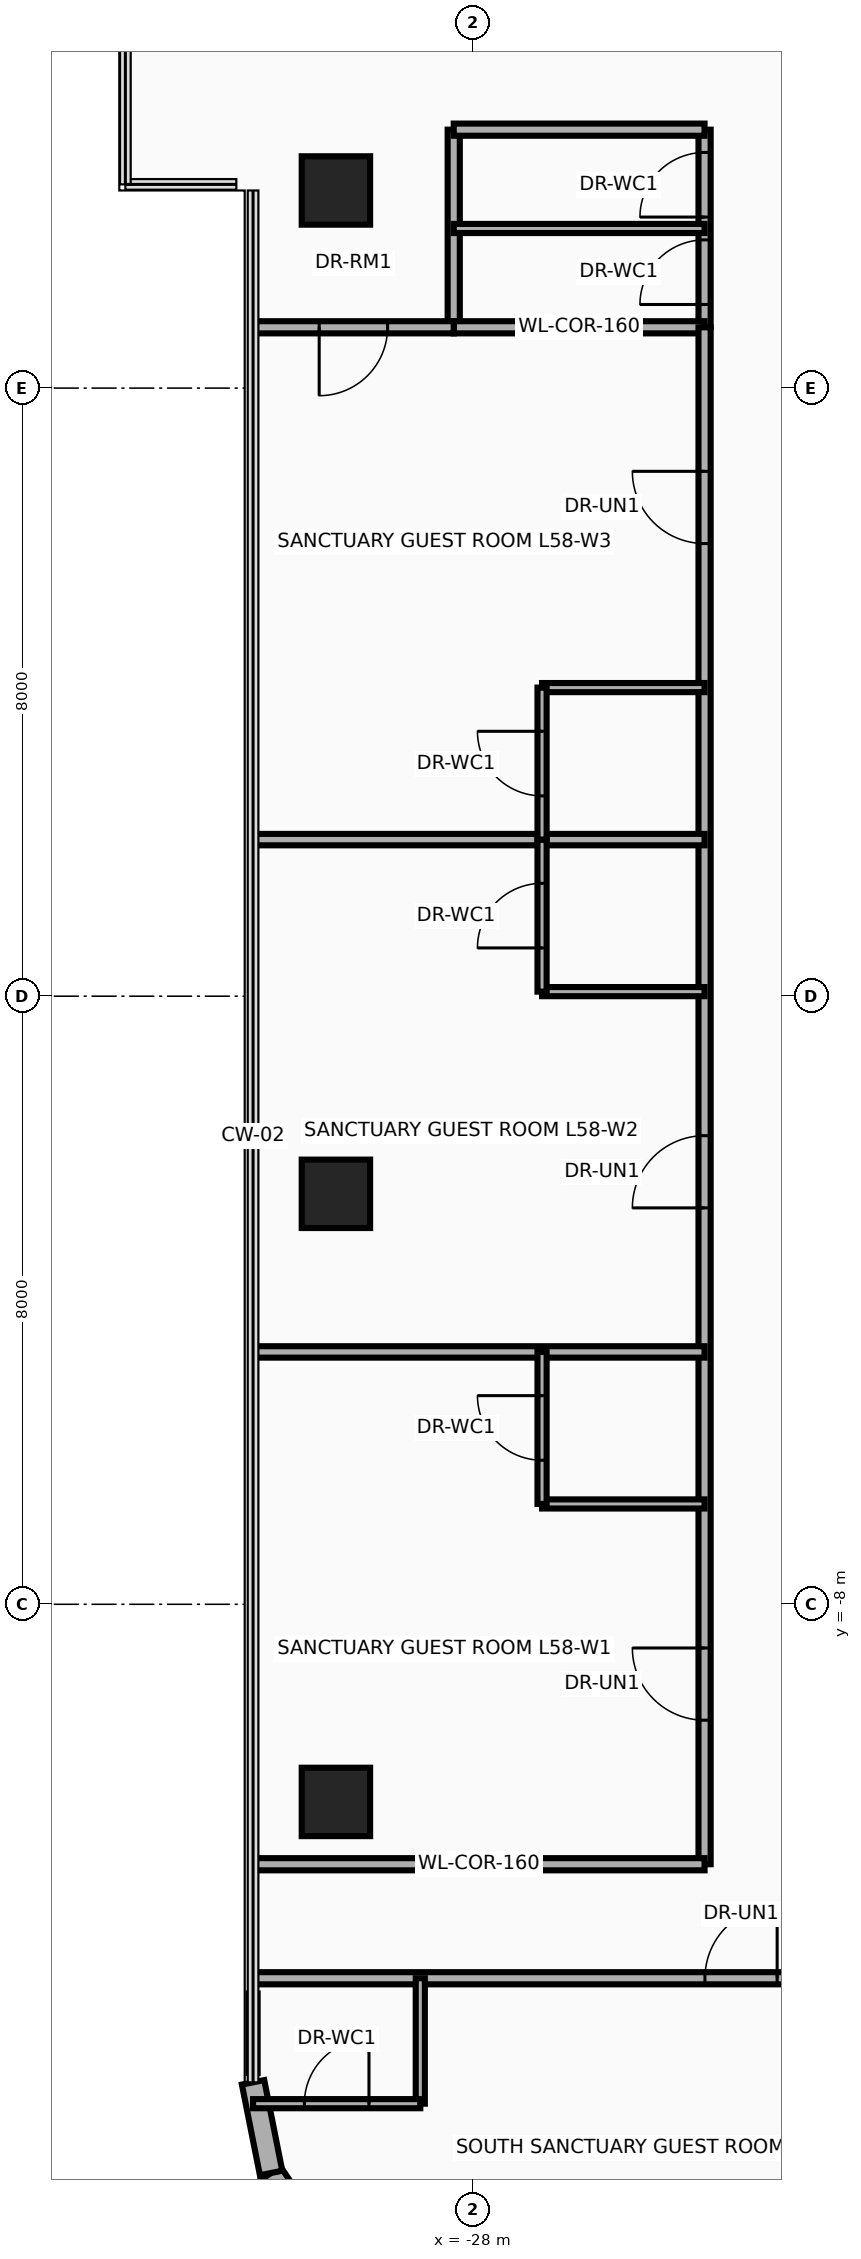
"""IFC4 building model, lengths in metres.
Left out: names, types, materials, properties, quantities, classifications, styles, units other than length and angle.
Written with IfcOpenShell. Run it as: python <this file> out.ifc"""

import sys

from ifc_helpers import new_model, si_unit, direction, frame, frame_2d, origin, origin_2d, place, context, subcontext, project, spatial, rectangle, extrude, source, transform, mapped, element, fill, save


model = new_model("IFC4")
c1 = context("Model", 3, precision=1e-05, world=origin(), true_north=direction((0.0, 1.0)))
c2 = subcontext(c1, "Body", "Model", "MODEL_VIEW")
j1 = project(units=[si_unit("LENGTHUNIT", "METRE"), si_unit("PLANEANGLEUNIT", "RADIAN")], contexts=[c1])
p1 = place(None, origin())
s1 = spatial("IfcSite", under=j1, at=p1, CompositionType="ELEMENT")
p2 = place(p1, origin())
s2 = spatial("IfcBuilding", under=s1, at=p2, CompositionType="ELEMENT")
p3 = place(p2, frame((0.0, 0.0, 226.5)))
s3 = spatial("IfcBuildingStorey", under=s2, at=p3, CompositionType="ELEMENT", Elevation=226.5)
m1 = source(origin(), c2, "Body", "SweptSolid", [
    extrude(rectangle(XDim=0.9, YDim=0.9, at=origin_2d()), origin(), (0.0, 0.0, 1.0), 3.5),
])
for number, where, z_axis, x_axis in (
    (1, (-29.8, -10.6, 0.0), (0.0, 0.0, 1.0), (1.0, 0.0, 0.0)),
    (2, (-29.8, -2.6, 0.0), (0.0, 0.0, 1.0), (1.0, 0.0, 0.0)),
    (3, (-29.8, 10.6, 0.0), (0.0, 0.0, 1.0), (1.0, 0.0, 0.0)),
):
    element("IfcColumn", number, at=place(p3, frame(where, z_axis=z_axis, x_axis=x_axis)), inside=s3, PredefinedType="COLUMN", context=c2, shape_type="MappedRepresentation", body=[
        mapped(m1, transform((0.0, 0.0, 0.0), x_axis=(1.0, 0.0, 0.0), y_axis=(0.0, 1.0, 0.0), z_axis=(0.0, 0.0, 1.0), scale=1.0)),
    ])
p4 = place(p3, frame((-29.983, -16.483, 0.0), z_axis=(0.0, 0.0, 1.0), x_axis=(-0.555635100982, 0.831426265255, 0.0)))
e4 = element("IfcWall", 4, at=p4, inside=s3, PredefinedType="SOLIDWALL", context=c2, shape_type="SweptSolid", body=[
    extrude(rectangle(XDim=1.205, YDim=0.3, at=frame_2d((0.603, 0.0))), origin(), (0.0, 0.0, 1.0), 3.26),
])
p5 = place(p3, frame((-30.653, -15.482, 0.0), z_axis=(0.0, 0.0, 1.0), x_axis=(-0.194996050505, 0.980804027463, 0.0)))
e5 = element("IfcWall", 5, at=p5, inside=s3, PredefinedType="SOLIDWALL", context=c2, shape_type="SweptSolid", body=[
    extrude(rectangle(XDim=1.216, YDim=0.3, at=frame_2d((0.608, 0.0))), origin(), (0.0, 0.0, 1.0), 3.26),
])
p6 = place(p3, frame((-28.25, 8.8, 0.0), z_axis=(0.0, 0.0, 1.0), x_axis=(0.0, 1.0, 0.0)))
e6 = element("IfcWall", 6, at=p6, inside=s3, PredefinedType="PARTITIONING", context=c2, shape_type="SweptSolid", body=[
    extrude(rectangle(XDim=2.6, YDim=0.16, at=frame_2d((1.3, 0.0))), origin(), (0.0, 0.0, 1.0), 2.544),
])
p7 = place(p3, frame((-24.95, 8.8, 0.0), z_axis=(0.0, 0.0, 1.0), x_axis=(0.0, 1.0, 0.0)))
e7 = element("IfcWall", 7, at=p7, inside=s3, PredefinedType="PARTITIONING", context=c2, shape_type="SweptSolid", body=[
    extrude(rectangle(XDim=2.6, YDim=0.16, at=frame_2d((1.3, 0.0))), origin(), (0.0, 0.0, 1.0), 2.544),
])
p8 = place(p7, frame((0.3, 0.0, 0.0)))
e8 = element("IfcOpeningElement", 8, at=p8, cuts=e7, PredefinedType="OPENING", context=c2, shape_type="SweptSolid", body=[
    extrude(rectangle(XDim=0.85, YDim=2.1, at=frame_2d((0.425, 1.05))), frame((0.0, 0.095, 0.0), z_axis=(0.0, -1.0, 0.0), x_axis=(1.0, 0.0, 0.0)), (0.0, 0.0, 1.0), 0.19),
])
p9 = place(p7, frame((1.45, 0.0, 0.0)))
e9 = element("IfcOpeningElement", 9, at=p9, cuts=e7, PredefinedType="OPENING", context=c2, shape_type="SweptSolid", body=[
    extrude(rectangle(XDim=0.85, YDim=2.1, at=frame_2d((0.425, 1.05))), frame((0.0, 0.095, 0.0), z_axis=(0.0, -1.0, 0.0), x_axis=(1.0, 0.0, 0.0)), (0.0, 0.0, 1.0), 0.19),
])
for number, where, z_axis, x_axis in (
    (10, (-28.25, 8.8, 0.0), (0.0, 0.0, 1.0), (1.0, 0.0, 0.0)),
    (11, (-28.25, 11.4, 0.0), (0.0, 0.0, 1.0), (1.0, 0.0, 0.0)),
):
    element("IfcWall", number, at=place(p3, frame(where, z_axis=z_axis, x_axis=x_axis)), inside=s3, PredefinedType="PARTITIONING", context=c2, shape_type="SweptSolid", body=[
        extrude(rectangle(XDim=3.3, YDim=0.16, at=frame_2d((1.65, 0.0))), origin(), (0.0, 0.0, 1.0), 3.26),
    ])
p10 = place(p3, frame((-28.25, 10.1, 0.0), z_axis=(0.0, 0.0, 1.0), x_axis=(1.0, 0.0, 0.0)))
e12 = element("IfcWall", 12, at=p10, inside=s3, PredefinedType="PARTITIONING", context=c2, shape_type="SweptSolid", body=[
    extrude(rectangle(XDim=3.3, YDim=0.12, at=frame_2d((1.65, 0.0))), origin(), (0.0, 0.0, 1.0), 3.26),
])
p11 = place(p3, frame((-24.95, -11.42, 0.0), z_axis=(0.0, 0.0, 1.0), x_axis=(0.0, 1.0, 0.0)))
e13 = element("IfcWall", 13, at=p11, inside=s3, PredefinedType="PARTITIONING", context=c2, shape_type="SweptSolid", body=[
    extrude(rectangle(XDim=20.22, YDim=0.16, at=frame_2d((10.11, 0.0))), origin(), (0.0, 0.0, 1.0), 2.544),
])
p12 = place(p11, frame((1.895, 0.0, 0.0)))
e14 = element("IfcOpeningElement", 14, at=p12, cuts=e13, PredefinedType="OPENING", context=c2, shape_type="SweptSolid", body=[
    extrude(rectangle(XDim=0.95, YDim=2.15, at=frame_2d((0.475, 1.075))), frame((0.0, 0.095, 0.0), z_axis=(0.0, -1.0, 0.0), x_axis=(1.0, 0.0, 0.0)), (0.0, 0.0, 1.0), 0.19),
])
p13 = place(p11, frame((8.635, 0.0, 0.0)))
e15 = element("IfcOpeningElement", 15, at=p13, cuts=e13, PredefinedType="OPENING", context=c2, shape_type="SweptSolid", body=[
    extrude(rectangle(XDim=0.95, YDim=2.15, at=frame_2d((0.475, 1.075))), frame((0.0, 0.095, 0.0), z_axis=(0.0, -1.0, 0.0), x_axis=(1.0, 0.0, 0.0)), (0.0, 0.0, 1.0), 0.19),
])
p14 = place(p11, frame((17.375, 0.0, 0.0)))
e16 = element("IfcOpeningElement", 16, at=p14, cuts=e13, PredefinedType="OPENING", context=c2, shape_type="SweptSolid", body=[
    extrude(rectangle(XDim=0.95, YDim=2.15, at=frame_2d((0.475, 1.075))), frame((0.0, 0.095, 0.0), z_axis=(0.0, -1.0, 0.0), x_axis=(1.0, 0.0, 0.0)), (0.0, 0.0, 1.0), 0.19),
])
p15 = place(p3, frame((-30.89, 8.8, 0.0), z_axis=(0.0, 0.0, 1.0), x_axis=(1.0, 0.0, 0.0)))
e17 = element("IfcWall", 17, at=p15, inside=s3, PredefinedType="PARTITIONING", context=c2, shape_type="SweptSolid", body=[
    extrude(rectangle(XDim=2.64, YDim=0.16, at=frame_2d((1.32, 0.0))), origin(), (0.0, 0.0, 1.0), 2.706),
])
p16 = place(p15, frame((0.87, 0.0, 0.0)))
e18 = element("IfcOpeningElement", 18, at=p16, cuts=e17, PredefinedType="OPENING", context=c2, shape_type="SweptSolid", body=[
    extrude(rectangle(XDim=0.9, YDim=2.1, at=frame_2d((0.45, 1.05))), frame((0.0, 0.095, 0.0), z_axis=(0.0, -1.0, 0.0), x_axis=(1.0, 0.0, 0.0)), (0.0, 0.0, 1.0), 0.19),
])
for number, where, z_axis, x_axis in (
    (19, (-30.89, -4.68, 0.0), (0.0, 0.0, 1.0), (1.0, 0.0, 0.0)),
    (20, (-30.89, 2.06, 0.0), (0.0, 0.0, 1.0), (1.0, 0.0, 0.0)),
):
    element("IfcWall", number, at=place(p3, frame(where, z_axis=z_axis, x_axis=x_axis)), inside=s3, PredefinedType="PARTITIONING", context=c2, shape_type="SweptSolid", body=[
        extrude(rectangle(XDim=5.94, YDim=0.15, at=frame_2d((2.97, 0.0))), origin(), (0.0, 0.0, 1.0), 2.706),
    ])
p17 = place(p3, frame((-27.088, -6.68, 0.0), z_axis=(0.0, 0.0, 1.0), x_axis=(1.0, 0.0, 0.0)))
e21 = element("IfcWall", 21, at=p17, inside=s3, PredefinedType="PARTITIONING", context=c2, shape_type="SweptSolid", body=[
    extrude(rectangle(XDim=2.138, YDim=0.12, at=frame_2d((1.069, 0.0))), origin(), (0.0, 0.0, 1.0), 2.839),
])
p18 = place(p3, frame((-27.088, -6.68, 0.0), z_axis=(0.0, 0.0, 1.0), x_axis=(0.0, 1.0, 0.0)))
e22 = element("IfcWall", 22, at=p18, inside=s3, PredefinedType="PARTITIONING", context=c2, shape_type="SweptSolid", body=[
    extrude(rectangle(XDim=2.0, YDim=0.12, at=frame_2d((1.0, 0.0))), origin(), (0.0, 0.0, 1.0), 2.839),
])
p19 = place(p18, frame((0.575, 0.0, 0.0)))
e23 = element("IfcOpeningElement", 23, at=p19, cuts=e22, PredefinedType="OPENING", context=c2, shape_type="SweptSolid", body=[
    extrude(rectangle(XDim=0.85, YDim=2.1, at=frame_2d((0.425, 1.05))), frame((0.0, 0.075, 0.0), z_axis=(0.0, -1.0, 0.0), x_axis=(1.0, 0.0, 0.0)), (0.0, 0.0, 1.0), 0.15),
])
p20 = place(p3, frame((-27.088, 0.06, 0.0), z_axis=(0.0, 0.0, 1.0), x_axis=(1.0, 0.0, 0.0)))
e24 = element("IfcWall", 24, at=p20, inside=s3, PredefinedType="PARTITIONING", context=c2, shape_type="SweptSolid", body=[
    extrude(rectangle(XDim=2.138, YDim=0.12, at=frame_2d((1.069, 0.0))), origin(), (0.0, 0.0, 1.0), 2.839),
])
p21 = place(p3, frame((-27.088, 0.06, 0.0), z_axis=(0.0, 0.0, 1.0), x_axis=(0.0, 1.0, 0.0)))
e25 = element("IfcWall", 25, at=p21, inside=s3, PredefinedType="PARTITIONING", context=c2, shape_type="SweptSolid", body=[
    extrude(rectangle(XDim=2.0, YDim=0.12, at=frame_2d((1.0, 0.0))), origin(), (0.0, 0.0, 1.0), 2.839),
])
p22 = place(p21, frame((0.575, 0.0, 0.0)))
e26 = element("IfcOpeningElement", 26, at=p22, cuts=e25, PredefinedType="OPENING", context=c2, shape_type="SweptSolid", body=[
    extrude(rectangle(XDim=0.85, YDim=2.1, at=frame_2d((0.425, 1.05))), frame((0.0, 0.075, 0.0), z_axis=(0.0, -1.0, 0.0), x_axis=(1.0, 0.0, 0.0)), (0.0, 0.0, 1.0), 0.15),
])
p23 = place(p3, frame((-27.088, 4.06, 0.0), z_axis=(0.0, 0.0, 1.0), x_axis=(1.0, 0.0, 0.0)))
e27 = element("IfcWall", 27, at=p23, inside=s3, PredefinedType="PARTITIONING", context=c2, shape_type="SweptSolid", body=[
    extrude(rectangle(XDim=2.138, YDim=0.12, at=frame_2d((1.069, 0.0))), origin(), (0.0, 0.0, 1.0), 3.26),
])
p24 = place(p3, frame((-27.088, 2.06, 0.0), z_axis=(0.0, 0.0, 1.0), x_axis=(0.0, 1.0, 0.0)))
e28 = element("IfcWall", 28, at=p24, inside=s3, PredefinedType="PARTITIONING", context=c2, shape_type="SweptSolid", body=[
    extrude(rectangle(XDim=2.0, YDim=0.12, at=frame_2d((1.0, 0.0))), origin(), (0.0, 0.0, 1.0), 2.839),
])
p25 = place(p24, frame((0.575, 0.0, 0.0)))
e29 = element("IfcOpeningElement", 29, at=p25, cuts=e28, PredefinedType="OPENING", context=c2, shape_type="SweptSolid", body=[
    extrude(rectangle(XDim=0.85, YDim=2.1, at=frame_2d((0.425, 1.05))), frame((0.0, 0.075, 0.0), z_axis=(0.0, -1.0, 0.0), x_axis=(1.0, 0.0, 0.0)), (0.0, 0.0, 1.0), 0.15),
])
p26 = place(p3, frame((-30.89, -12.92, 0.0), z_axis=(0.0, 0.0, 1.0), x_axis=(1.0, 0.0, 0.0)))
e30 = element("IfcWall", 30, at=p26, inside=s3, PredefinedType="PARTITIONING", context=c2, shape_type="SweptSolid", body=[
    extrude(rectangle(XDim=21.28, YDim=0.16, at=frame_2d((10.64, 0.0))), origin(), (0.0, 0.0, 1.0), 2.634),
])
p27 = place(p26, frame((5.945, 0.0, 0.0)))
e31 = element("IfcOpeningElement", 31, at=p27, cuts=e30, PredefinedType="OPENING", context=c2, shape_type="SweptSolid", body=[
    extrude(rectangle(XDim=0.95, YDim=2.15, at=frame_2d((0.475, 1.075))), frame((0.0, 0.095, 0.0), z_axis=(0.0, -1.0, 0.0), x_axis=(1.0, 0.0, 0.0)), (0.0, 0.0, 1.0), 0.19),
])
p28 = place(p26, frame((16.585, 0.0, 0.0)))
e32 = element("IfcOpeningElement", 32, at=p28, cuts=e30, PredefinedType="OPENING", context=c2, shape_type="SweptSolid", body=[
    extrude(rectangle(XDim=0.95, YDim=2.15, at=frame_2d((0.475, 1.075))), frame((0.0, 0.095, 0.0), z_axis=(0.0, -1.0, 0.0), x_axis=(1.0, 0.0, 0.0)), (0.0, 0.0, 1.0), 0.19),
])
p29 = place(p3, frame((-28.69, -14.57, 0.0), z_axis=(0.0, 0.0, 1.0), x_axis=(0.0, 1.0, 0.0)))
e33 = element("IfcWall", 33, at=p29, inside=s3, PredefinedType="PARTITIONING", context=c2, shape_type="SweptSolid", body=[
    extrude(rectangle(XDim=1.65, YDim=0.12, at=frame_2d((0.825, 0.0))), origin(), (0.0, 0.0, 1.0), 3.26),
])
p30 = place(p3, frame((-30.89, -14.57, 0.0), z_axis=(0.0, 0.0, 1.0), x_axis=(1.0, 0.0, 0.0)))
e34 = element("IfcWall", 34, at=p30, inside=s3, PredefinedType="PARTITIONING", context=c2, shape_type="SweptSolid", body=[
    extrude(rectangle(XDim=2.2, YDim=0.12, at=frame_2d((1.1, 0.0))), origin(), (0.0, 0.0, 1.0), 3.26),
])
p31 = place(p30, frame((0.675, 0.0, 0.0)))
e35 = element("IfcOpeningElement", 35, at=p31, cuts=e34, PredefinedType="OPENING", context=c2, shape_type="SweptSolid", body=[
    extrude(rectangle(XDim=0.85, YDim=2.1, at=frame_2d((0.425, 1.05))), frame((0.0, 0.075, 0.0), z_axis=(0.0, -1.0, 0.0), x_axis=(1.0, 0.0, 0.0)), (0.0, 0.0, 1.0), 0.15),
])
p32 = place(p3, frame((-30.89, -14.167, 0.0), z_axis=(0.0, 0.0, 1.0), x_axis=(0.0, 1.0, 0.0)))
e36 = element("IfcWall", 36, at=p32, inside=s3, PredefinedType="PARTITIONING", context=c2, shape_type="SweptSolid", body=[
    extrude(rectangle(XDim=1.047, YDim=0.12, at=frame_2d((0.523, 0.0))), origin(), (0.0, 0.0, 1.0), 3.26),
])
p33 = place(p3, frame((-30.89, -11.42, 0.0), z_axis=(0.0, 0.0, 1.0), x_axis=(1.0, 0.0, 0.0)))
e37 = element("IfcWall", 37, at=p33, inside=s3, PredefinedType="PARTITIONING", context=c2, shape_type="SweptSolid", body=[
    extrude(rectangle(XDim=5.94, YDim=0.16, at=frame_2d((2.97, 0.0))), origin(), (0.0, 0.0, 1.0), 3.26),
])
p34 = place(p8, origin())
e38 = element("IfcDoor", 38, at=p34, inside=s3, OperationType="SINGLE_SWING_LEFT", PredefinedType="DOOR", context=c2, shape_type="SweptSolid", body=[
    extrude(rectangle(XDim=0.85, YDim=2.1, at=frame_2d((0.425, 1.05))), frame((0.0, 0.025, 0.0), z_axis=(0.0, -1.0, 0.0), x_axis=(1.0, 0.0, 0.0)), (0.0, 0.0, 1.0), 0.05),
])
fill(e8, e38)
p35 = place(p9, origin())
e39 = element("IfcDoor", 39, at=p35, inside=s3, OperationType="SINGLE_SWING_RIGHT", PredefinedType="DOOR", context=c2, shape_type="SweptSolid", body=[
    extrude(rectangle(XDim=0.85, YDim=2.1, at=frame_2d((0.425, 1.05))), frame((0.0, 0.025, 0.0), z_axis=(0.0, -1.0, 0.0), x_axis=(1.0, 0.0, 0.0)), (0.0, 0.0, 1.0), 0.05),
])
fill(e9, e39)
p36 = place(p16, frame((0.9, 0.0, 0.0), z_axis=(0.0, 0.0, 1.0), x_axis=(-1.0, 0.0, 0.0)))
e40 = element("IfcDoor", 40, at=p36, inside=s3, OperationType="SINGLE_SWING_LEFT", PredefinedType="DOOR", context=c2, shape_type="SweptSolid", body=[
    extrude(rectangle(XDim=0.9, YDim=2.1, at=frame_2d((0.45, 1.05))), frame((0.0, 0.025, 0.0), z_axis=(0.0, -1.0, 0.0), x_axis=(1.0, 0.0, 0.0)), (0.0, 0.0, 1.0), 0.05),
])
fill(e18, e40)
p37 = place(p12, origin())
e41 = element("IfcDoor", 41, at=p37, inside=s3, OperationType="SINGLE_SWING_RIGHT", PredefinedType="DOOR", context=c2, shape_type="SweptSolid", body=[
    extrude(rectangle(XDim=0.95, YDim=2.15, at=frame_2d((0.475, 1.075))), frame((0.0, 0.025, 0.0), z_axis=(0.0, -1.0, 0.0), x_axis=(1.0, 0.0, 0.0)), (0.0, 0.0, 1.0), 0.05),
])
fill(e14, e41)
p38 = place(p19, origin())
e42 = element("IfcDoor", 42, at=p38, inside=s3, OperationType="SINGLE_SWING_LEFT", PredefinedType="DOOR", context=c2, shape_type="SweptSolid", body=[
    extrude(rectangle(XDim=0.85, YDim=2.1, at=frame_2d((0.425, 1.05))), frame((0.0, 0.025, 0.0), z_axis=(0.0, -1.0, 0.0), x_axis=(1.0, 0.0, 0.0)), (0.0, 0.0, 1.0), 0.05),
])
fill(e23, e42)
p39 = place(p13, origin())
e43 = element("IfcDoor", 43, at=p39, inside=s3, OperationType="SINGLE_SWING_RIGHT", PredefinedType="DOOR", context=c2, shape_type="SweptSolid", body=[
    extrude(rectangle(XDim=0.95, YDim=2.15, at=frame_2d((0.475, 1.075))), frame((0.0, 0.025, 0.0), z_axis=(0.0, -1.0, 0.0), x_axis=(1.0, 0.0, 0.0)), (0.0, 0.0, 1.0), 0.05),
])
fill(e15, e43)
p40 = place(p22, origin())
e44 = element("IfcDoor", 44, at=p40, inside=s3, OperationType="SINGLE_SWING_LEFT", PredefinedType="DOOR", context=c2, shape_type="SweptSolid", body=[
    extrude(rectangle(XDim=0.85, YDim=2.1, at=frame_2d((0.425, 1.05))), frame((0.0, 0.025, 0.0), z_axis=(0.0, -1.0, 0.0), x_axis=(1.0, 0.0, 0.0)), (0.0, 0.0, 1.0), 0.05),
])
fill(e26, e44)
p41 = place(p14, origin())
e45 = element("IfcDoor", 45, at=p41, inside=s3, OperationType="SINGLE_SWING_RIGHT", PredefinedType="DOOR", context=c2, shape_type="SweptSolid", body=[
    extrude(rectangle(XDim=0.95, YDim=2.15, at=frame_2d((0.475, 1.075))), frame((0.0, 0.025, 0.0), z_axis=(0.0, -1.0, 0.0), x_axis=(1.0, 0.0, 0.0)), (0.0, 0.0, 1.0), 0.05),
])
fill(e16, e45)
p42 = place(p25, origin())
e46 = element("IfcDoor", 46, at=p42, inside=s3, OperationType="SINGLE_SWING_LEFT", PredefinedType="DOOR", context=c2, shape_type="SweptSolid", body=[
    extrude(rectangle(XDim=0.85, YDim=2.1, at=frame_2d((0.425, 1.05))), frame((0.0, 0.025, 0.0), z_axis=(0.0, -1.0, 0.0), x_axis=(1.0, 0.0, 0.0)), (0.0, 0.0, 1.0), 0.05),
])
fill(e29, e46)
p43 = place(p27, origin())
e47 = element("IfcDoor", 47, at=p43, inside=s3, OperationType="SINGLE_SWING_RIGHT", PredefinedType="DOOR", context=c2, shape_type="SweptSolid", body=[
    extrude(rectangle(XDim=0.95, YDim=2.15, at=frame_2d((0.475, 1.075))), frame((0.0, 0.025, 0.0), z_axis=(0.0, -1.0, 0.0), x_axis=(1.0, 0.0, 0.0)), (0.0, 0.0, 1.0), 0.05),
])
fill(e31, e47)
p44 = place(p31, origin())
e48 = element("IfcDoor", 48, at=p44, inside=s3, OperationType="SINGLE_SWING_LEFT", PredefinedType="DOOR", context=c2, shape_type="SweptSolid", body=[
    extrude(rectangle(XDim=0.85, YDim=2.1, at=frame_2d((0.425, 1.05))), frame((0.0, 0.025, 0.0), z_axis=(0.0, -1.0, 0.0), x_axis=(1.0, 0.0, 0.0)), (0.0, 0.0, 1.0), 0.05),
])
fill(e35, e48)
save(model, sys.argv[1])
